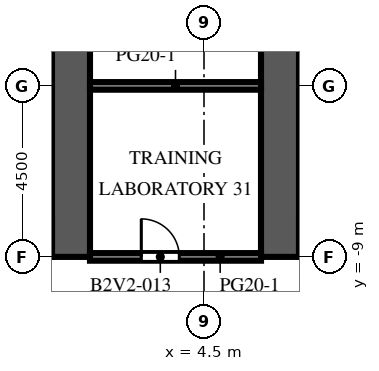
"""IFC4 building model, lengths in metres.
Left out: names, types, materials, properties, quantities, classifications, styles, units other than length and angle.
Written with IfcOpenShell. Run it as: python <this file> out.ifc"""

import sys

from ifc_helpers import new_model, si_unit, direction, frame, frame_2d, origin, place, context, subcontext, project, spatial, rectangle, extrude, element, fill, save


model = new_model("IFC4")
c1 = context("Model", 3, precision=1e-05, world=origin(), true_north=direction((0.0, 1.0)))
c2 = subcontext(c1, "Body", "Model", "MODEL_VIEW")
j1 = project(units=[si_unit("LENGTHUNIT", "METRE"), si_unit("PLANEANGLEUNIT", "RADIAN")], contexts=[c1])
p1 = place(None, origin())
s1 = spatial("IfcSite", under=j1, at=p1, CompositionType="ELEMENT")
p2 = place(p1, origin())
s2 = spatial("IfcBuilding", under=s1, at=p2, CompositionType="ELEMENT")
p3 = place(p2, frame((0.0, 0.0, 62.4)))
s3 = spatial("IfcBuildingStorey", under=s2, at=p3, CompositionType="ELEMENT", Elevation=62.4)
p4 = place(p3, frame((1.0, -9.0, 0.0), z_axis=(0.0, 0.0, 1.0), x_axis=(0.0, 1.0, 0.0)))
e1 = element("IfcWall", 1, at=p4, inside=s3, PredefinedType="SHEAR", context=c2, shape_type="SweptSolid", body=[
    extrude(rectangle(XDim=27.5, YDim=1.0, at=frame_2d((13.75, 0.0))), origin(), (0.0, 0.0, 1.0), 4.1),
])
p5 = place(p4, frame((12.55, 0.0, 0.0)))
e2 = element("IfcOpeningElement", 2, at=p5, cuts=e1, PredefinedType="OPENING", context=c2, shape_type="SweptSolid", body=[
    extrude(rectangle(XDim=2.4, YDim=2.4, at=frame_2d((1.2, 1.2))), frame((0.0, 0.51, 0.0), z_axis=(0.0, -1.0, 0.0), x_axis=(1.0, 0.0, 0.0)), (0.0, 0.0, 1.0), 1.02),
])
p6 = place(p4, frame((5.55, 0.0, 0.0)))
e3 = element("IfcOpeningElement", 3, at=p6, cuts=e1, PredefinedType="OPENING", context=c2, shape_type="SweptSolid", body=[
    extrude(rectangle(XDim=0.905, YDim=2.1, at=frame_2d((0.453, 1.05))), frame((0.0, 0.51, 0.0), z_axis=(0.0, -1.0, 0.0), x_axis=(1.0, 0.0, 0.0)), (0.0, 0.0, 1.0), 1.02),
])
p7 = place(p4, frame((23.363, 0.0, 0.0)))
e4 = element("IfcOpeningElement", 4, at=p7, cuts=e1, PredefinedType="OPENING", context=c2, shape_type="SweptSolid", body=[
    extrude(rectangle(XDim=1.2, YDim=2.1, at=frame_2d((0.6, 1.05))), frame((0.0, 0.51, 0.0), z_axis=(0.0, -1.0, 0.0), x_axis=(1.0, 0.0, 0.0)), (0.0, 0.0, 1.0), 1.02),
])
p8 = place(p3, frame((6.5, -9.0, 0.0), z_axis=(0.0, 0.0, 1.0), x_axis=(0.0, 1.0, 0.0)))
e5 = element("IfcWall", 5, at=p8, inside=s3, PredefinedType="SHEAR", context=c2, shape_type="SweptSolid", body=[
    extrude(rectangle(XDim=27.5, YDim=1.0, at=frame_2d((13.75, 0.0))), origin(), (0.0, 0.0, 1.0), 4.1),
])
p9 = place(p8, frame((12.55, 0.0, 0.0)))
e6 = element("IfcOpeningElement", 6, at=p9, cuts=e5, PredefinedType="OPENING", context=c2, shape_type="SweptSolid", body=[
    extrude(rectangle(XDim=2.4, YDim=2.4, at=frame_2d((1.2, 1.2))), frame((0.0, 0.51, 0.0), z_axis=(0.0, -1.0, 0.0), x_axis=(1.0, 0.0, 0.0)), (0.0, 0.0, 1.0), 1.02),
])
p10 = place(p8, frame((5.55, 0.0, 0.0)))
e7 = element("IfcOpeningElement", 7, at=p10, cuts=e5, PredefinedType="OPENING", context=c2, shape_type="SweptSolid", body=[
    extrude(rectangle(XDim=0.905, YDim=2.1, at=frame_2d((0.453, 1.05))), frame((0.0, 0.51, 0.0), z_axis=(0.0, -1.0, 0.0), x_axis=(1.0, 0.0, 0.0)), (0.0, 0.0, 1.0), 1.02),
])
p11 = place(p8, frame((23.363, 0.0, 0.0)))
e8 = element("IfcOpeningElement", 8, at=p11, cuts=e5, PredefinedType="OPENING", context=c2, shape_type="SweptSolid", body=[
    extrude(rectangle(XDim=1.2, YDim=2.1, at=frame_2d((0.6, 1.05))), frame((0.0, 0.51, 0.0), z_axis=(0.0, -1.0, 0.0), x_axis=(1.0, 0.0, 0.0)), (0.0, 0.0, 1.0), 1.02),
])
p12 = place(p3, frame((1.5, -9.0, 0.0), z_axis=(0.0, 0.0, 1.0), x_axis=(1.0, 0.0, 0.0)))
e9 = element("IfcWall", 9, at=p12, inside=s3, PredefinedType="PARTITIONING", context=c2, shape_type="SweptSolid", body=[
    extrude(rectangle(XDim=4.5, YDim=0.2, at=frame_2d((2.25, 0.0))), origin(), (0.0, 0.0, 1.0), 3.65),
])
p13 = place(p12, frame((1.35, 0.0, 0.0)))
e10 = element("IfcOpeningElement", 10, at=p13, cuts=e9, PredefinedType="OPENING", context=c2, shape_type="SweptSolid", body=[
    extrude(rectangle(XDim=1.0, YDim=2.1, at=frame_2d((0.5, 1.05))), frame((0.0, 0.11, 0.0), z_axis=(0.0, -1.0, 0.0), x_axis=(1.0, 0.0, 0.0)), (0.0, 0.0, 1.0), 0.22),
])
p14 = place(p3, frame((1.5, -4.5, 0.0), z_axis=(0.0, 0.0, 1.0), x_axis=(1.0, 0.0, 0.0)))
e11 = element("IfcWall", 11, at=p14, inside=s3, PredefinedType="PARTITIONING", context=c2, shape_type="SweptSolid", body=[
    extrude(rectangle(XDim=4.5, YDim=0.2, at=frame_2d((2.25, 0.0))), origin(), (0.0, 0.0, 1.0), 3.65),
])
p15 = place(p13, origin())
e12 = element("IfcDoor", 12, at=p15, inside=s3, OperationType="SINGLE_SWING_LEFT", PredefinedType="DOOR", context=c2, shape_type="SweptSolid", body=[
    extrude(rectangle(XDim=1.0, YDim=2.1, at=frame_2d((0.5, 1.05))), frame((0.0, 0.025, 0.0), z_axis=(0.0, -1.0, 0.0), x_axis=(1.0, 0.0, 0.0)), (0.0, 0.0, 1.0), 0.05),
])
fill(e10, e12)
save(model, sys.argv[1])
